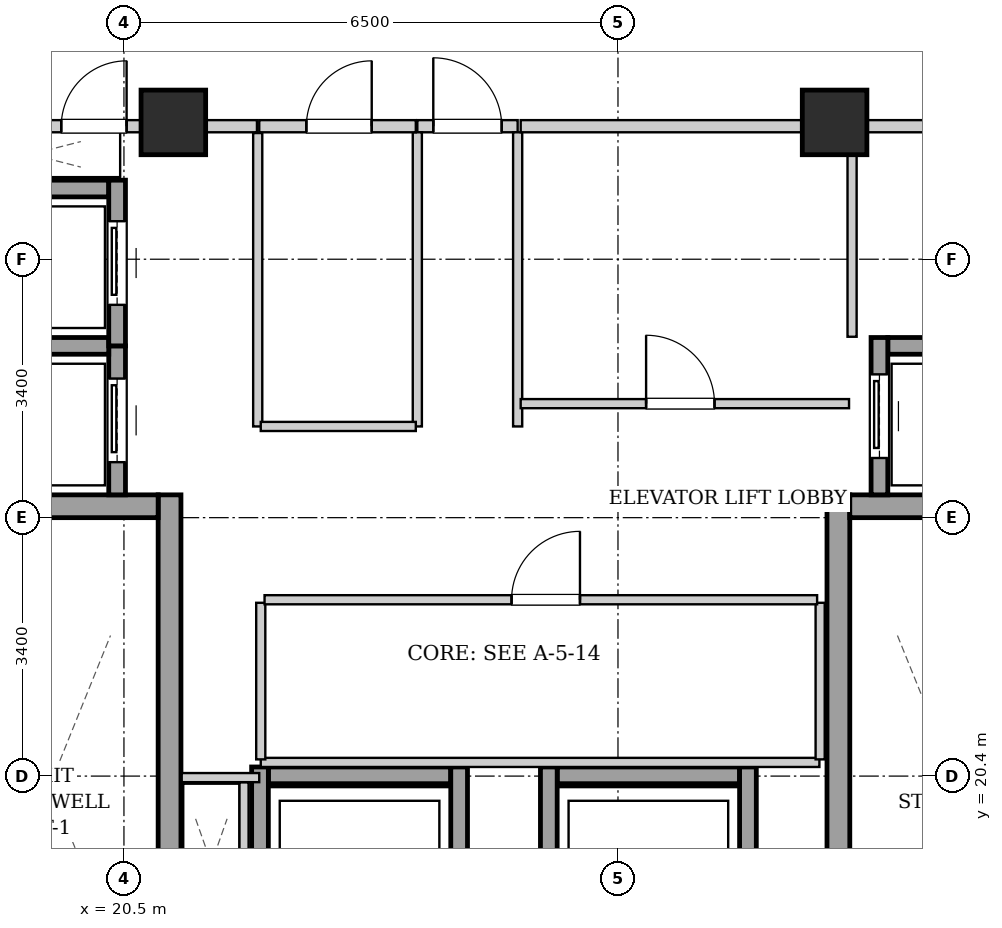
"""IFC4 building model, lengths in metres.
Left out: names, types, materials, properties, quantities, classifications, styles, units other than length and angle.
Written with IfcOpenShell. Run it as: python <this file> out.ifc"""

import sys

from ifc_helpers import new_model, si_unit, direction, frame, frame_2d, origin, origin_2d, place, context, subcontext, project, spatial, rectangle, extrude, element, fill, save


model = new_model("IFC4")
c1 = context("Model", 3, precision=1e-05, world=origin(), true_north=direction((0.0, 1.0)))
c2 = subcontext(c1, "Body", "Model", "MODEL_VIEW")
j1 = project(units=[si_unit("LENGTHUNIT", "METRE"), si_unit("PLANEANGLEUNIT", "RADIAN")], contexts=[c1])
p1 = place(None, origin())
s1 = spatial("IfcSite", under=j1, at=p1, CompositionType="ELEMENT")
p2 = place(p1, origin())
s2 = spatial("IfcBuilding", under=s1, at=p2, CompositionType="ELEMENT")
p3 = place(p2, frame((0.0, 0.0, 184.3)))
s3 = spatial("IfcBuildingStorey", under=s2, at=p3, CompositionType="ELEMENT", Elevation=184.3)
for number, where, z_axis, x_axis in (
    (1, (21.15, 29.0, 0.0), (0.0, 0.0, 1.0), (1.0, 0.0, 0.0)),
    (2, (29.85, 29.0, 0.0), (0.0, 0.0, 1.0), (1.0, 0.0, 0.0)),
):
    element("IfcColumn", number, at=place(p3, frame(where, z_axis=z_axis, x_axis=x_axis)), inside=s3, PredefinedType="COLUMN", context=c2, shape_type="SweptSolid", body=[
        extrude(rectangle(XDim=0.85, YDim=0.85, at=origin_2d()), origin(), (0.0, 0.0, 1.0), 3.3),
    ])
p4 = place(p3, frame((21.1, 15.1, 0.0), z_axis=(0.0, 0.0, 1.0), x_axis=(0.0, 1.0, 0.0)))
e3 = element("IfcWall", 3, at=p4, inside=s3, PredefinedType="SHEAR", context=c2, shape_type="SweptSolid", body=[
    extrude(rectangle(XDim=9.0, YDim=0.3, at=frame_2d((4.5, 0.0))), origin(), (0.0, 0.0, 1.0), 3.04),
])
p5 = place(p3, frame((18.1, 23.95, 0.0), z_axis=(0.0, 0.0, 1.0), x_axis=(1.0, 0.0, 0.0)))
e4 = element("IfcWall", 4, at=p5, inside=s3, PredefinedType="SHEAR", context=c2, shape_type="SweptSolid", body=[
    extrude(rectangle(XDim=2.85, YDim=0.3, at=frame_2d((1.425, 0.0))), origin(), (0.0, 0.0, 1.0), 3.04),
])
p6 = place(p3, frame((29.9, 15.1, 0.0), z_axis=(0.0, 0.0, 1.0), x_axis=(0.0, 1.0, 0.0)))
e5 = element("IfcWall", 5, at=p6, inside=s3, PredefinedType="SHEAR", context=c2, shape_type="SweptSolid", body=[
    extrude(rectangle(XDim=9.0, YDim=0.3, at=frame_2d((4.5, 0.0))), origin(), (0.0, 0.0, 1.0), 3.04),
])
p7 = place(p3, frame((30.05, 23.95, 0.0), z_axis=(0.0, 0.0, 1.0), x_axis=(1.0, 0.0, 0.0)))
e6 = element("IfcWall", 6, at=p7, inside=s3, PredefinedType="SHEAR", context=c2, shape_type="SweptSolid", body=[
    extrude(rectangle(XDim=2.85, YDim=0.3, at=frame_2d((1.425, 0.0))), origin(), (0.0, 0.0, 1.0), 3.04),
])
p8 = place(p3, frame((20.41, 24.1, 0.0), z_axis=(0.0, 0.0, 1.0), x_axis=(0.0, 1.0, 0.0)))
e7 = element("IfcWall", 7, at=p8, inside=s3, PredefinedType="SHEAR", context=c2, shape_type="SweptSolid", body=[
    extrude(rectangle(XDim=1.96, YDim=0.22, at=frame_2d((0.98, 0.0))), origin(), (0.0, 0.0, 1.0), 3.04),
])
p9 = place(p8, frame((0.43, 0.0, 0.0)))
e8 = element("IfcOpeningElement", 8, at=p9, cuts=e7, PredefinedType="OPENING", context=c2, shape_type="SweptSolid", body=[
    extrude(rectangle(XDim=1.1, YDim=2.15, at=frame_2d((0.55, 1.075))), frame((0.0, 0.12, 0.0), z_axis=(0.0, -1.0, 0.0), x_axis=(1.0, 0.0, 0.0)), (0.0, 0.0, 1.0), 0.24),
])
for number, where, z_axis, x_axis in (
    (9, (18.4, 26.06, 0.0), (0.0, 0.0, 1.0), (1.0, 0.0, 0.0)),
    (10, (18.4, 28.13, 0.0), (0.0, 0.0, 1.0), (1.0, 0.0, 0.0)),
):
    element("IfcWall", number, at=place(p3, frame(where, z_axis=z_axis, x_axis=x_axis)), inside=s3, PredefinedType="SHEAR", context=c2, shape_type="SweptSolid", body=[
        extrude(rectangle(XDim=1.9, YDim=0.22, at=frame_2d((0.95, 0.0))), origin(), (0.0, 0.0, 1.0), 3.04),
    ])
p10 = place(p3, frame((20.41, 26.06, 0.0), z_axis=(0.0, 0.0, 1.0), x_axis=(0.0, 1.0, 0.0)))
e11 = element("IfcWall", 11, at=p10, inside=s3, PredefinedType="SHEAR", context=c2, shape_type="SweptSolid", body=[
    extrude(rectangle(XDim=2.18, YDim=0.22, at=frame_2d((1.09, 0.0))), origin(), (0.0, 0.0, 1.0), 3.04),
])
p11 = place(p10, frame((0.54, 0.0, 0.0)))
e12 = element("IfcOpeningElement", 12, at=p11, cuts=e11, PredefinedType="OPENING", context=c2, shape_type="SweptSolid", body=[
    extrude(rectangle(XDim=1.1, YDim=2.15, at=frame_2d((0.55, 1.075))), frame((0.0, 0.12, 0.0), z_axis=(0.0, -1.0, 0.0), x_axis=(1.0, 0.0, 0.0)), (0.0, 0.0, 1.0), 0.24),
])
p12 = place(p3, frame((30.55, 26.06, 0.0), z_axis=(0.0, 0.0, 1.0), x_axis=(1.0, 0.0, 0.0)))
e13 = element("IfcWall", 13, at=p12, inside=s3, PredefinedType="SHEAR", context=c2, shape_type="SweptSolid", body=[
    extrude(rectangle(XDim=1.9, YDim=0.22, at=frame_2d((0.95, 0.0))), origin(), (0.0, 0.0, 1.0), 3.04),
])
p13 = place(p3, frame((30.44, 24.1, 0.0), z_axis=(0.0, 0.0, 1.0), x_axis=(0.0, 1.0, 0.0)))
e14 = element("IfcWall", 14, at=p13, inside=s3, PredefinedType="SHEAR", context=c2, shape_type="SweptSolid", body=[
    extrude(rectangle(XDim=2.07, YDim=0.22, at=frame_2d((1.035, 0.0))), origin(), (0.0, 0.0, 1.0), 3.04),
])
p14 = place(p13, frame((0.485, 0.0, 0.0)))
e15 = element("IfcOpeningElement", 15, at=p14, cuts=e14, PredefinedType="OPENING", context=c2, shape_type="SweptSolid", body=[
    extrude(rectangle(XDim=1.1, YDim=2.15, at=frame_2d((0.55, 1.075))), frame((0.0, 0.12, 0.0), z_axis=(0.0, -1.0, 0.0), x_axis=(1.0, 0.0, 0.0)), (0.0, 0.0, 1.0), 0.24),
])
p15 = place(p3, frame((22.4, 20.41, 0.0), z_axis=(0.0, 0.0, 1.0), x_axis=(1.0, 0.0, 0.0)))
e16 = element("IfcWall", 16, at=p15, inside=s3, PredefinedType="SHEAR", context=c2, shape_type="SweptSolid", body=[
    extrude(rectangle(XDim=2.4, YDim=0.22, at=frame_2d((1.2, 0.0))), origin(), (0.0, 0.0, 1.0), 3.04),
])
for number, where, z_axis, x_axis in (
    (17, (22.29, 17.98, 0.0), (0.0, 0.0, 1.0), (0.0, 1.0, 0.0)),
    (18, (24.91, 17.98, 0.0), (0.0, 0.0, 1.0), (0.0, 1.0, 0.0)),
):
    element("IfcWall", number, at=place(p3, frame(where, z_axis=z_axis, x_axis=x_axis)), inside=s3, PredefinedType="SHEAR", context=c2, shape_type="SweptSolid", body=[
        extrude(rectangle(XDim=2.54, YDim=0.22, at=frame_2d((1.27, 0.0))), origin(), (0.0, 0.0, 1.0), 3.04),
    ])
p16 = place(p3, frame((26.2, 20.41, 0.0), z_axis=(0.0, 0.0, 1.0), x_axis=(1.0, 0.0, 0.0)))
e19 = element("IfcWall", 19, at=p16, inside=s3, PredefinedType="SHEAR", context=c2, shape_type="SweptSolid", body=[
    extrude(rectangle(XDim=2.4, YDim=0.22, at=frame_2d((1.2, 0.0))), origin(), (0.0, 0.0, 1.0), 3.04),
])
for number, where, z_axis, x_axis in (
    (20, (26.09, 17.98, 0.0), (0.0, 0.0, 1.0), (0.0, 1.0, 0.0)),
    (21, (28.71, 17.98, 0.0), (0.0, 0.0, 1.0), (0.0, 1.0, 0.0)),
):
    element("IfcWall", number, at=place(p3, frame(where, z_axis=z_axis, x_axis=x_axis)), inside=s3, PredefinedType="SHEAR", context=c2, shape_type="SweptSolid", body=[
        extrude(rectangle(XDim=2.54, YDim=0.22, at=frame_2d((1.27, 0.0))), origin(), (0.0, 0.0, 1.0), 3.04),
    ])
p17 = place(p3, frame((24.36, 28.95, 0.0), z_axis=(0.0, 0.0, 1.0), x_axis=(1.0, 0.0, 0.0)))
e22 = element("IfcWall", 22, at=p17, inside=s3, PredefinedType="PARTITIONING", context=c2, shape_type="SweptSolid", body=[
    extrude(rectangle(XDim=1.32, YDim=0.16, at=frame_2d((0.66, 0.0))), origin(), (0.0, 0.0, 1.0), 2.556),
])
p18 = place(p17, frame((0.21, 0.0, 0.0)))
e23 = element("IfcOpeningElement", 23, at=p18, cuts=e22, PredefinedType="OPENING", context=c2, shape_type="SweptSolid", body=[
    extrude(rectangle(XDim=0.9, YDim=2.05, at=frame_2d((0.45, 1.025))), frame((0.0, 0.09, 0.0), z_axis=(0.0, -1.0, 0.0), x_axis=(1.0, 0.0, 0.0)), (0.0, 0.0, 1.0), 0.18),
])
p19 = place(p3, frame((17.96, 28.95, 0.0), z_axis=(0.0, 0.0, 1.0), x_axis=(1.0, 0.0, 0.0)))
e24 = element("IfcWall", 24, at=p19, inside=s3, PredefinedType="PARTITIONING", context=c2, shape_type="SweptSolid", body=[
    extrude(rectangle(XDim=4.29, YDim=0.16, at=frame_2d((2.145, 0.0))), origin(), (0.0, 0.0, 1.0), 2.556),
])
p20 = place(p19, frame((1.715, 0.0, 0.0)))
e25 = element("IfcOpeningElement", 25, at=p20, cuts=e24, PredefinedType="OPENING", context=c2, shape_type="SweptSolid", body=[
    extrude(rectangle(XDim=0.86, YDim=2.05, at=frame_2d((0.43, 1.025))), frame((0.0, 0.09, 0.0), z_axis=(0.0, -1.0, 0.0), x_axis=(1.0, 0.0, 0.0)), (0.0, 0.0, 1.0), 0.18),
])
p21 = place(p3, frame((22.08, 18.2, 0.0), z_axis=(0.0, 0.0, 1.0), x_axis=(0.0, 1.0, 0.0)))
e26 = element("IfcWall", 26, at=p21, inside=s3, PredefinedType="PARTITIONING", context=c2, shape_type="SweptSolid", body=[
    extrude(rectangle(XDim=2.12, YDim=0.12, at=frame_2d((1.06, 0.0))), origin(), (0.0, 0.0, 1.0), 3.04),
])
p22 = place(p3, frame((22.28, 20.38, 0.0), z_axis=(0.0, 0.0, 1.0), x_axis=(-1.0, 0.0, 0.0)))
e27 = element("IfcWall", 27, at=p22, inside=s3, PredefinedType="PARTITIONING", context=c2, shape_type="SweptSolid", body=[
    extrude(rectangle(XDim=1.02, YDim=0.12, at=frame_2d((0.51, 0.0))), origin(), (0.0, 0.0, 1.0), 3.04),
])
for number, where, z_axis, x_axis in (
    (28, (24.36, 25.0, 0.0), (0.0, 0.0, 1.0), (0.0, 1.0, 0.0)),
    (29, (25.68, 25.0, 0.0), (0.0, 0.0, 1.0), (0.0, 1.0, 0.0)),
):
    element("IfcWall", number, at=place(p3, frame(where, z_axis=z_axis, x_axis=x_axis)), inside=s3, PredefinedType="PARTITIONING", context=c2, shape_type="SweptSolid", body=[
        extrude(rectangle(XDim=3.87, YDim=0.12, at=frame_2d((1.935, 0.0))), origin(), (0.0, 0.0, 1.0), 3.04),
    ])
p23 = place(p3, frame((30.08, 26.18, 0.0), z_axis=(0.0, 0.0, 1.0), x_axis=(0.0, 1.0, 0.0)))
e30 = element("IfcWall", 30, at=p23, inside=s3, PredefinedType="PARTITIONING", context=c2, shape_type="SweptSolid", body=[
    extrude(rectangle(XDim=2.68, YDim=0.12, at=frame_2d((1.34, 0.0))), origin(), (0.0, 0.0, 1.0), 3.04),
])
p24 = place(p3, frame((30.08, 28.95, 0.0), z_axis=(0.0, 0.0, 1.0), x_axis=(1.0, 0.0, 0.0)))
e31 = element("IfcWall", 31, at=p24, inside=s3, PredefinedType="PARTITIONING", context=c2, shape_type="SweptSolid", body=[
    extrude(rectangle(XDim=2.96, YDim=0.16, at=frame_2d((1.48, 0.0))), origin(), (0.0, 0.0, 1.0), 3.04),
])
p25 = place(p24, frame((1.045, 0.0, 0.0)))
e32 = element("IfcOpeningElement", 32, at=p25, cuts=e31, PredefinedType="OPENING", context=c2, shape_type="SweptSolid", body=[
    extrude(rectangle(XDim=0.86, YDim=2.05, at=frame_2d((0.43, 1.025))), frame((0.0, 0.09, 0.0), z_axis=(0.0, -1.0, 0.0), x_axis=(1.0, 0.0, 0.0)), (0.0, 0.0, 1.0), 0.18),
])
p26 = place(p3, frame((22.26, 25.0, 0.0), z_axis=(0.0, 0.0, 1.0), x_axis=(0.0, 1.0, 0.0)))
e33 = element("IfcWall", 33, at=p26, inside=s3, PredefinedType="PARTITIONING", context=c2, shape_type="SweptSolid", body=[
    extrude(rectangle(XDim=3.86, YDim=0.12, at=frame_2d((1.93, 0.0))), origin(), (0.0, 0.0, 1.0), 3.04),
])
p27 = place(p3, frame((22.3, 25.0, 0.0), z_axis=(0.0, 0.0, 1.0), x_axis=(1.0, 0.0, 0.0)))
e34 = element("IfcWall", 34, at=p27, inside=s3, PredefinedType="PARTITIONING", context=c2, shape_type="SweptSolid", body=[
    extrude(rectangle(XDim=2.04, YDim=0.12, at=frame_2d((1.02, 0.0))), origin(), (0.0, 0.0, 1.0), 3.04),
])
p28 = place(p3, frame((22.28, 28.95, 0.0), z_axis=(0.0, 0.0, 1.0), x_axis=(1.0, 0.0, 0.0)))
e35 = element("IfcWall", 35, at=p28, inside=s3, PredefinedType="PARTITIONING", context=c2, shape_type="SweptSolid", body=[
    extrude(rectangle(XDim=2.06, YDim=0.16, at=frame_2d((1.03, 0.0))), origin(), (0.0, 0.0, 1.0), 2.556),
])
p29 = place(p28, frame((0.62, 0.0, 0.0)))
e36 = element("IfcOpeningElement", 36, at=p29, cuts=e35, PredefinedType="OPENING", context=c2, shape_type="SweptSolid", body=[
    extrude(rectangle(XDim=0.86, YDim=2.05, at=frame_2d((0.43, 1.025))), frame((0.0, 0.09, 0.0), z_axis=(0.0, -1.0, 0.0), x_axis=(1.0, 0.0, 0.0)), (0.0, 0.0, 1.0), 0.18),
])
p30 = place(p3, frame((25.72, 28.95, 0.0), z_axis=(0.0, 0.0, 1.0), x_axis=(1.0, 0.0, 0.0)))
e37 = element("IfcWall", 37, at=p30, inside=s3, PredefinedType="PARTITIONING", context=c2, shape_type="SweptSolid", body=[
    extrude(rectangle(XDim=4.32, YDim=0.16, at=frame_2d((2.16, 0.0))), origin(), (0.0, 0.0, 1.0), 2.556),
])
p31 = place(p3, frame((25.72, 25.3, 0.0), z_axis=(0.0, 0.0, 1.0), x_axis=(1.0, 0.0, 0.0)))
e38 = element("IfcWall", 38, at=p31, inside=s3, PredefinedType="PARTITIONING", context=c2, shape_type="SweptSolid", body=[
    extrude(rectangle(XDim=4.32, YDim=0.12, at=frame_2d((2.16, 0.0))), origin(), (0.0, 0.0, 1.0), 3.04),
])
p32 = place(p31, frame((1.65, 0.0, 0.0)))
e39 = element("IfcOpeningElement", 39, at=p32, cuts=e38, PredefinedType="OPENING", context=c2, shape_type="SweptSolid", body=[
    extrude(rectangle(XDim=0.9, YDim=2.05, at=frame_2d((0.45, 1.025))), frame((0.0, 0.07, 0.0), z_axis=(0.0, -1.0, 0.0), x_axis=(1.0, 0.0, 0.0)), (0.0, 0.0, 1.0), 0.14),
])
p33 = place(p3, frame((22.3, 20.58, 0.0), z_axis=(0.0, 0.0, 1.0), x_axis=(1.0, 0.0, 0.0)))
e40 = element("IfcWall", 40, at=p33, inside=s3, PredefinedType="PARTITIONING", context=c2, shape_type="SweptSolid", body=[
    extrude(rectangle(XDim=7.35, YDim=0.12, at=frame_2d((3.675, 0.0))), origin(), (0.0, 0.0, 1.0), 3.04),
])
for number, where, z_axis, x_axis in (
    (41, (22.3, 20.62, 0.0), (0.0, 0.0, 1.0), (0.0, 1.0, 0.0)),
    (42, (29.66, 20.62, 0.0), (0.0, 0.0, 1.0), (0.0, 1.0, 0.0)),
):
    element("IfcWall", number, at=place(p3, frame(where, z_axis=z_axis, x_axis=x_axis)), inside=s3, PredefinedType="PARTITIONING", context=c2, shape_type="SweptSolid", body=[
        extrude(rectangle(XDim=2.06, YDim=0.12, at=frame_2d((1.03, 0.0))), origin(), (0.0, 0.0, 1.0), 3.04),
    ])
p34 = place(p3, frame((22.35, 22.72, 0.0), z_axis=(0.0, 0.0, 1.0), x_axis=(1.0, 0.0, 0.0)))
e43 = element("IfcWall", 43, at=p34, inside=s3, PredefinedType="PARTITIONING", context=c2, shape_type="SweptSolid", body=[
    extrude(rectangle(XDim=7.27, YDim=0.12, at=frame_2d((3.635, 0.0))), origin(), (0.0, 0.0, 1.0), 3.04),
])
p35 = place(p34, frame((3.25, 0.0, 0.0)))
e44 = element("IfcOpeningElement", 44, at=p35, cuts=e43, PredefinedType="OPENING", context=c2, shape_type="SweptSolid", body=[
    extrude(rectangle(XDim=0.9, YDim=2.05, at=frame_2d((0.45, 1.025))), frame((0.0, 0.07, 0.0), z_axis=(0.0, -1.0, 0.0), x_axis=(1.0, 0.0, 0.0)), (0.0, 0.0, 1.0), 0.14),
])
p36 = place(p9, origin())
e45 = element("IfcDoor", 45, at=p36, inside=s3, OperationType="SLIDING_TO_LEFT", PredefinedType="DOOR", context=c2, shape_type="SweptSolid", body=[
    extrude(rectangle(XDim=1.1, YDim=2.15, at=frame_2d((0.55, 1.075))), frame((0.0, 0.025, 0.0), z_axis=(0.0, -1.0, 0.0), x_axis=(1.0, 0.0, 0.0)), (0.0, 0.0, 1.0), 0.05),
])
fill(e8, e45)
p37 = place(p11, origin())
e46 = element("IfcDoor", 46, at=p37, inside=s3, OperationType="SLIDING_TO_LEFT", PredefinedType="DOOR", context=c2, shape_type="SweptSolid", body=[
    extrude(rectangle(XDim=1.1, YDim=2.15, at=frame_2d((0.55, 1.075))), frame((0.0, 0.025, 0.0), z_axis=(0.0, -1.0, 0.0), x_axis=(1.0, 0.0, 0.0)), (0.0, 0.0, 1.0), 0.05),
])
fill(e12, e46)
p38 = place(p14, origin())
e47 = element("IfcDoor", 47, at=p38, inside=s3, OperationType="SLIDING_TO_LEFT", PredefinedType="DOOR", context=c2, shape_type="SweptSolid", body=[
    extrude(rectangle(XDim=1.1, YDim=2.15, at=frame_2d((0.55, 1.075))), frame((0.0, 0.025, 0.0), z_axis=(0.0, -1.0, 0.0), x_axis=(1.0, 0.0, 0.0)), (0.0, 0.0, 1.0), 0.05),
])
fill(e15, e47)
p39 = place(p18, origin())
e48 = element("IfcDoor", 48, at=p39, inside=s3, OperationType="SINGLE_SWING_LEFT", PredefinedType="DOOR", context=c2, shape_type="SweptSolid", body=[
    extrude(rectangle(XDim=0.9, YDim=2.05, at=frame_2d((0.45, 1.025))), frame((0.0, 0.025, 0.0), z_axis=(0.0, -1.0, 0.0), x_axis=(1.0, 0.0, 0.0)), (0.0, 0.0, 1.0), 0.05),
])
fill(e23, e48)
p40 = place(p20, origin())
e49 = element("IfcDoor", 49, at=p40, inside=s3, OperationType="SINGLE_SWING_RIGHT", PredefinedType="DOOR", context=c2, shape_type="SweptSolid", body=[
    extrude(rectangle(XDim=0.86, YDim=2.05, at=frame_2d((0.43, 1.025))), frame((0.0, 0.025, 0.0), z_axis=(0.0, -1.0, 0.0), x_axis=(1.0, 0.0, 0.0)), (0.0, 0.0, 1.0), 0.05),
])
fill(e25, e49)
p41 = place(p29, origin())
e50 = element("IfcDoor", 50, at=p41, inside=s3, OperationType="SINGLE_SWING_RIGHT", PredefinedType="DOOR", context=c2, shape_type="SweptSolid", body=[
    extrude(rectangle(XDim=0.86, YDim=2.05, at=frame_2d((0.43, 1.025))), frame((0.0, 0.025, 0.0), z_axis=(0.0, -1.0, 0.0), x_axis=(1.0, 0.0, 0.0)), (0.0, 0.0, 1.0), 0.05),
])
fill(e36, e50)
p42 = place(p32, origin())
e51 = element("IfcDoor", 51, at=p42, inside=s3, OperationType="SINGLE_SWING_LEFT", PredefinedType="DOOR", context=c2, shape_type="SweptSolid", body=[
    extrude(rectangle(XDim=0.9, YDim=2.05, at=frame_2d((0.45, 1.025))), frame((0.0, 0.025, 0.0), z_axis=(0.0, -1.0, 0.0), x_axis=(1.0, 0.0, 0.0)), (0.0, 0.0, 1.0), 0.05),
])
fill(e39, e51)
p43 = place(p35, origin())
e52 = element("IfcDoor", 52, at=p43, inside=s3, OperationType="SINGLE_SWING_RIGHT", PredefinedType="DOOR", context=c2, shape_type="SweptSolid", body=[
    extrude(rectangle(XDim=0.9, YDim=2.05, at=frame_2d((0.45, 1.025))), frame((0.0, 0.025, 0.0), z_axis=(0.0, -1.0, 0.0), x_axis=(1.0, 0.0, 0.0)), (0.0, 0.0, 1.0), 0.05),
])
fill(e44, e52)
save(model, sys.argv[1])
